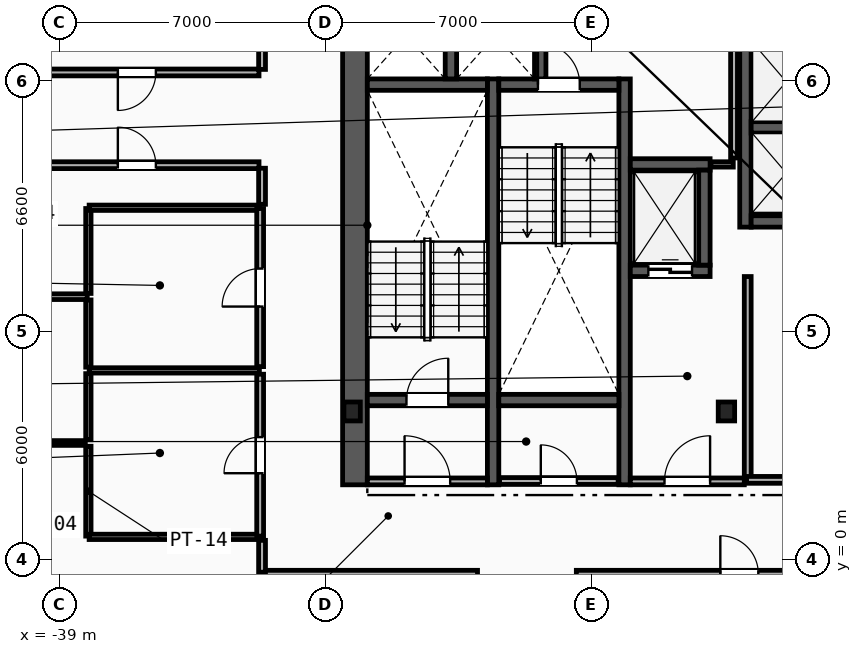
"""IFC4 building model, lengths in metres.
Left out: names, types, materials, properties, quantities, classifications, styles, units other than length and angle.
Written with IfcOpenShell. Run it as: python <this file> out.ifc"""

import sys

from ifc_helpers import new_model, si_unit, direction, frame, frame_2d, origin, origin_2d, place, context, subcontext, project, spatial, rectangle, i_section, extrude, element, fill, save


model = new_model("IFC4")
c1 = context("Model", 3, precision=1e-05, world=origin(), true_north=direction((0.0, 1.0)))
c2 = subcontext(c1, "Body", "Model", "MODEL_VIEW")
j1 = project(units=[si_unit("LENGTHUNIT", "METRE"), si_unit("PLANEANGLEUNIT", "RADIAN")], contexts=[c1])
p1 = place(None, origin())
s1 = spatial("IfcSite", under=j1, at=p1, CompositionType="ELEMENT")
p2 = place(p1, origin())
s2 = spatial("IfcBuilding", under=s1, at=p2, CompositionType="ELEMENT")
p3 = place(p2, frame((0.0, 0.0, 147.6)))
s3 = spatial("IfcBuildingStorey", under=s2, at=p3, CompositionType="ELEMENT", Elevation=147.6)
for number, where, z_axis, x_axis in (
    (1, (-31.3, 3.9, 0.0), (0.0, 0.0, 1.0), (1.0, 0.0, 0.0)),
    (2, (-21.45, 3.9, 0.0), (0.0, 0.0, 1.0), (1.0, 0.0, 0.0)),
):
    element("IfcColumn", number, at=place(p3, frame(where, z_axis=z_axis, x_axis=x_axis)), inside=s3, PredefinedType="COLUMN", context=c2, shape_type="SweptSolid", body=[
        extrude(i_section(OverallWidth=0.432, OverallDepth=0.498, WebThickness=0.056, FlangeThickness=0.089, FilletRadius=0.018, at=origin_2d()), origin(), (0.0, 0.0, 1.0), 3.6),
    ])
p4 = place(p3, frame((-31.225, 1.97, 0.0), z_axis=(0.0, 0.0, 1.0), x_axis=(0.0, 1.0, 0.0)))
e3 = element("IfcWall", 3, at=p4, inside=s3, PredefinedType="SHEAR", context=c2, shape_type="SweptSolid", body=[
    extrude(rectangle(XDim=13.33, YDim=0.65, at=frame_2d((6.665, 0.0))), origin(), (0.0, 0.0, 1.0), 3.36),
])
for number, where, z_axis, x_axis in (
    (4, (-27.59, 1.97, 0.0), (0.0, 0.0, 1.0), (0.0, 1.0, 0.0)),
    (5, (-24.13, 1.97, 0.0), (0.0, 0.0, 1.0), (0.0, 1.0, 0.0)),
):
    element("IfcWall", number, at=place(p3, frame(where, z_axis=z_axis, x_axis=x_axis)), inside=s3, PredefinedType="SHEAR", context=c2, shape_type="SweptSolid", body=[
        extrude(rectangle(XDim=10.68, YDim=0.3, at=frame_2d((5.34, 0.0))), origin(), (0.0, 0.0, 1.0), 3.36),
    ])
p5 = place(p3, frame((-30.9, 4.2, 0.0), z_axis=(0.0, 0.0, 1.0), x_axis=(1.0, 0.0, 0.0)))
e6 = element("IfcWall", 6, at=p5, inside=s3, PredefinedType="SHEAR", context=c2, shape_type="SweptSolid", body=[
    extrude(rectangle(XDim=3.16, YDim=0.3, at=frame_2d((1.58, 0.0))), origin(), (0.0, 0.0, 1.0), 3.36),
])
p6 = place(p5, frame((1.03, 0.0, 0.0)))
e7 = element("IfcOpeningElement", 7, at=p6, cuts=e6, PredefinedType="OPENING", context=c2, shape_type="SweptSolid", body=[
    extrude(rectangle(XDim=1.1, YDim=2.15, at=frame_2d((0.55, 1.075))), frame((0.0, 0.16, 0.0), z_axis=(0.0, -1.0, 0.0), x_axis=(1.0, 0.0, 0.0)), (0.0, 0.0, 1.0), 0.32),
])
p7 = place(p3, frame((-30.9, 12.5, 0.0), z_axis=(0.0, 0.0, 1.0), x_axis=(1.0, 0.0, 0.0)))
e8 = element("IfcWall", 8, at=p7, inside=s3, PredefinedType="SHEAR", context=c2, shape_type="SweptSolid", body=[
    extrude(rectangle(XDim=3.16, YDim=0.3, at=frame_2d((1.58, 0.0))), origin(), (0.0, 0.0, 1.0), 3.36),
])
p8 = place(p3, frame((-27.44, 12.5, 0.0), z_axis=(0.0, 0.0, 1.0), x_axis=(1.0, 0.0, 0.0)))
e9 = element("IfcWall", 9, at=p8, inside=s3, PredefinedType="SHEAR", context=c2, shape_type="SweptSolid", body=[
    extrude(rectangle(XDim=3.16, YDim=0.3, at=frame_2d((1.58, 0.0))), origin(), (0.0, 0.0, 1.0), 3.36),
])
p9 = place(p8, frame((1.03, 0.0, 0.0)))
e10 = element("IfcOpeningElement", 10, at=p9, cuts=e9, PredefinedType="OPENING", context=c2, shape_type="SweptSolid", body=[
    extrude(rectangle(XDim=1.1, YDim=2.15, at=frame_2d((0.55, 1.075))), frame((0.0, 0.16, 0.0), z_axis=(0.0, -1.0, 0.0), x_axis=(1.0, 0.0, 0.0)), (0.0, 0.0, 1.0), 0.32),
])
p10 = place(p3, frame((-27.44, 4.2, 0.0), z_axis=(0.0, 0.0, 1.0), x_axis=(1.0, 0.0, 0.0)))
e11 = element("IfcWall", 11, at=p10, inside=s3, PredefinedType="SHEAR", context=c2, shape_type="SweptSolid", body=[
    extrude(rectangle(XDim=3.16, YDim=0.3, at=frame_2d((1.58, 0.0))), origin(), (0.0, 0.0, 1.0), 3.36),
])
p11 = place(p3, frame((-20.89, 2.15, 0.0), z_axis=(0.0, 0.0, 1.0), x_axis=(0.0, 1.0, 0.0)))
e12 = element("IfcWall", 12, at=p11, inside=s3, PredefinedType="PARTITIONING", context=c2, shape_type="SweptSolid", body=[
    extrude(rectangle(XDim=5.3, YDim=0.18, at=frame_2d((2.65, 0.0))), origin(), (0.0, 0.0, 1.0), 3.36),
])
p12 = place(p3, frame((-23.98, 2.06, 0.0), z_axis=(0.0, 0.0, 1.0), x_axis=(1.0, 0.0, 0.0)))
e13 = element("IfcWall", 13, at=p12, inside=s3, PredefinedType="PARTITIONING", context=c2, shape_type="SweptSolid", body=[
    extrude(rectangle(XDim=3.0, YDim=0.18, at=frame_2d((1.5, 0.0))), origin(), (0.0, 0.0, 1.0), 3.36),
])
p13 = place(p12, frame((0.9, 0.0, 0.0)))
e14 = element("IfcOpeningElement", 14, at=p13, cuts=e13, PredefinedType="OPENING", context=c2, shape_type="SweptSolid", body=[
    extrude(rectangle(XDim=1.2, YDim=2.15, at=frame_2d((0.6, 1.075))), frame((0.0, 0.1, 0.0), z_axis=(0.0, -1.0, 0.0), x_axis=(1.0, 0.0, 0.0)), (0.0, 0.0, 1.0), 0.2),
])
p14 = place(p3, frame((-30.9, 2.06, 0.0), z_axis=(0.0, 0.0, 1.0), x_axis=(1.0, 0.0, 0.0)))
e15 = element("IfcWall", 15, at=p14, inside=s3, PredefinedType="PARTITIONING", context=c2, shape_type="SweptSolid", body=[
    extrude(rectangle(XDim=3.16, YDim=0.18, at=frame_2d((1.58, 0.0))), origin(), (0.0, 0.0, 1.0), 3.36),
])
p15 = place(p14, frame((0.98, 0.0, 0.0)))
e16 = element("IfcOpeningElement", 16, at=p15, cuts=e15, PredefinedType="OPENING", context=c2, shape_type="SweptSolid", body=[
    extrude(rectangle(XDim=1.2, YDim=2.15, at=frame_2d((0.6, 1.075))), frame((0.0, 0.1, 0.0), z_axis=(0.0, -1.0, 0.0), x_axis=(1.0, 0.0, 0.0)), (0.0, 0.0, 1.0), 0.2),
])
p16 = place(p3, frame((-23.98, 7.6, 0.0), z_axis=(0.0, 0.0, 1.0), x_axis=(1.0, 0.0, 0.0)))
e17 = element("IfcWall", 17, at=p16, inside=s3, PredefinedType="SHEAR", context=c2, shape_type="SweptSolid", body=[
    extrude(rectangle(XDim=2.1, YDim=0.3, at=frame_2d((1.05, 0.0))), origin(), (0.0, 0.0, 1.0), 3.36),
])
p17 = place(p16, frame((0.475, 0.0, 0.0)))
e18 = element("IfcOpeningElement", 18, at=p17, cuts=e17, PredefinedType="OPENING", context=c2, shape_type="SweptSolid", body=[
    extrude(rectangle(XDim=1.15, YDim=2.2, at=frame_2d((0.575, 1.1))), frame((0.0, 0.16, 0.0), z_axis=(0.0, -1.0, 0.0), x_axis=(1.0, 0.0, 0.0)), (0.0, 0.0, 1.0), 0.32),
])
p18 = place(p3, frame((-23.98, 10.4, 0.0), z_axis=(0.0, 0.0, 1.0), x_axis=(1.0, 0.0, 0.0)))
e19 = element("IfcWall", 19, at=p18, inside=s3, PredefinedType="SHEAR", context=c2, shape_type="SweptSolid", body=[
    extrude(rectangle(XDim=2.1, YDim=0.3, at=frame_2d((1.05, 0.0))), origin(), (0.0, 0.0, 1.0), 3.36),
])
p19 = place(p3, frame((-22.03, 7.75, 0.0), z_axis=(0.0, 0.0, 1.0), x_axis=(0.0, 1.0, 0.0)))
e20 = element("IfcWall", 20, at=p19, inside=s3, PredefinedType="SHEAR", context=c2, shape_type="SweptSolid", body=[
    extrude(rectangle(XDim=2.5, YDim=0.3, at=frame_2d((1.25, 0.0))), origin(), (0.0, 0.0, 1.0), 3.36),
])
for number, where, z_axis, x_axis in (
    (21, (-28.7, 12.65, 0.0), (0.0, 0.0, 1.0), (0.0, 1.0, 0.0)),
    (22, (-26.35, 12.65, 0.0), (0.0, 0.0, 1.0), (0.0, 1.0, 0.0)),
):
    element("IfcWall", number, at=place(p3, frame(where, z_axis=z_axis, x_axis=x_axis)), inside=s3, PredefinedType="SHEAR", context=c2, shape_type="SweptSolid", body=[
        extrude(rectangle(XDim=2.3, YDim=0.3, at=frame_2d((1.15, 0.0))), origin(), (0.0, 0.0, 1.0), 3.36),
    ])
p20 = place(p3, frame((-20.95, 8.75, 0.0), z_axis=(0.0, 0.0, 1.0), x_axis=(0.0, 1.0, 0.0)))
e23 = element("IfcWall", 23, at=p20, inside=s3, PredefinedType="SHEAR", context=c2, shape_type="SweptSolid", body=[
    extrude(rectangle(XDim=5.25, YDim=0.3, at=frame_2d((2.625, 0.0))), origin(), (0.0, 0.0, 1.0), 3.36),
])
p21 = place(p3, frame((-20.8, 8.9, 0.0), z_axis=(0.0, 0.0, 1.0), x_axis=(1.0, 0.0, 0.0)))
e24 = element("IfcWall", 24, at=p21, inside=s3, PredefinedType="SHEAR", context=c2, shape_type="SweptSolid", body=[
    extrude(rectangle(XDim=2.15, YDim=0.3, at=frame_2d((1.075, 0.0))), origin(), (0.0, 0.0, 1.0), 3.36),
])
p22 = place(p3, frame((-20.8, 11.375, 0.0), z_axis=(0.0, 0.0, 1.0), x_axis=(1.0, 0.0, 0.0)))
e25 = element("IfcWall", 25, at=p22, inside=s3, PredefinedType="SHEAR", context=c2, shape_type="SweptSolid", body=[
    extrude(rectangle(XDim=1.85, YDim=0.3, at=frame_2d((0.925, 0.0))), origin(), (0.0, 0.0, 1.0), 3.36),
])
p23 = place(p3, frame((-21.86, 10.4, 0.0), z_axis=(0.0, 0.0, 1.0), x_axis=(1.0, 0.0, 0.0)))
e26 = element("IfcWall", 26, at=p23, inside=s3, PredefinedType="PARTITIONING", context=c2, shape_type="SweptSolid", body=[
    extrude(rectangle(XDim=0.59, YDim=0.14, at=frame_2d((0.295, 0.0))), origin(), (0.0, 0.0, 1.0), 3.36),
])
p24 = place(p3, frame((-21.25, 10.57, 0.0), z_axis=(0.0, 0.0, 1.0), x_axis=(0.0, 1.0, 0.0)))
e27 = element("IfcWall", 27, at=p24, inside=s3, PredefinedType="PARTITIONING", context=c2, shape_type="SweptSolid", body=[
    extrude(rectangle(XDim=4.36, YDim=0.18, at=frame_2d((2.18, 0.0))), origin(), (0.0, 0.0, 1.0), 3.36),
])
p25 = place(p3, frame((-27.42, 2.07, 0.0), z_axis=(0.0, 0.0, 1.0), x_axis=(1.0, 0.0, 0.0)))
e28 = element("IfcWall", 28, at=p25, inside=s3, PredefinedType="PARTITIONING", context=c2, shape_type="SweptSolid", body=[
    extrude(rectangle(XDim=3.12, YDim=0.18, at=frame_2d((1.56, 0.0))), origin(), (0.0, 0.0, 1.0), 3.36),
])
p26 = place(p25, frame((1.085, 0.0, 0.0)))
e29 = element("IfcOpeningElement", 29, at=p26, cuts=e28, PredefinedType="OPENING", context=c2, shape_type="SweptSolid", body=[
    extrude(rectangle(XDim=0.95, YDim=2.1, at=frame_2d((0.475, 1.05))), frame((0.0, 0.1, 0.0), z_axis=(0.0, -1.0, 0.0), x_axis=(1.0, 0.0, 0.0)), (0.0, 0.0, 1.0), 0.2),
])
p27 = place(p3, frame((-38.24, 0.62, 0.0), z_axis=(0.0, 0.0, 1.0), x_axis=(0.0, 1.0, 0.0)))
e30 = element("IfcWall", 30, at=p27, inside=s3, PredefinedType="PARTITIONING", context=c2, shape_type="SweptSolid", body=[
    extrude(rectangle(XDim=2.365, YDim=0.14, at=frame_2d((1.183, 0.0))), origin(), (0.0, 0.0, 1.0), 3.36),
])
p28 = place(p3, frame((-38.24, 3.155, 0.0), z_axis=(0.0, 0.0, 1.0), x_axis=(0.0, 1.0, 0.0)))
e31 = element("IfcWall", 31, at=p28, inside=s3, PredefinedType="PARTITIONING", context=c2, shape_type="SweptSolid", body=[
    extrude(rectangle(XDim=1.74, YDim=0.14, at=frame_2d((0.87, 0.0))), origin(), (0.0, 0.0, 1.0), 3.36),
])
p29 = place(p3, frame((-38.24, 5.065, 0.0), z_axis=(0.0, 0.0, 1.0), x_axis=(0.0, 1.0, 0.0)))
e32 = element("IfcWall", 32, at=p29, inside=s3, PredefinedType="PARTITIONING", context=c2, shape_type="SweptSolid", body=[
    extrude(rectangle(XDim=1.77, YDim=0.14, at=frame_2d((0.885, 0.0))), origin(), (0.0, 0.0, 1.0), 3.36),
])
p30 = place(p3, frame((-38.24, 7.005, 0.0), z_axis=(0.0, 0.0, 1.0), x_axis=(0.0, 1.0, 0.0)))
e33 = element("IfcWall", 33, at=p30, inside=s3, PredefinedType="PARTITIONING", context=c2, shape_type="SweptSolid", body=[
    extrude(rectangle(XDim=2.235, YDim=0.14, at=frame_2d((1.118, 0.0))), origin(), (0.0, 0.0, 1.0), 3.36),
])
for number, where, z_axis, x_axis in (
    (34, (-38.22, 0.6, 0.0), (0.0, 0.0, 1.0), (1.0, 0.0, 0.0)),
    (35, (-38.22, 4.98, 0.0), (0.0, 0.0, 1.0), (1.0, 0.0, 0.0)),
    (36, (-38.22, 9.26, 0.0), (0.0, 0.0, 1.0), (1.0, 0.0, 0.0)),
):
    element("IfcWall", number, at=place(p3, frame(where, z_axis=z_axis, x_axis=x_axis)), inside=s3, PredefinedType="PARTITIONING", context=c2, shape_type="SweptSolid", body=[
        extrude(rectangle(XDim=4.48, YDim=0.14, at=frame_2d((2.24, 0.0))), origin(), (0.0, 0.0, 1.0), 3.36),
    ])
p31 = place(p3, frame((-33.72, 0.62, 0.0), z_axis=(0.0, 0.0, 1.0), x_axis=(0.0, 1.0, 0.0)))
e37 = element("IfcWall", 37, at=p31, inside=s3, PredefinedType="PARTITIONING", context=c2, shape_type="SweptSolid", body=[
    extrude(rectangle(XDim=4.26, YDim=0.18, at=frame_2d((2.13, 0.0))), origin(), (0.0, 0.0, 1.0), 3.36),
])
p32 = place(p31, frame((1.655, 0.0, 0.0)))
e38 = element("IfcOpeningElement", 38, at=p32, cuts=e37, PredefinedType="OPENING", context=c2, shape_type="SweptSolid", body=[
    extrude(rectangle(XDim=0.95, YDim=2.1, at=frame_2d((0.475, 1.05))), frame((0.0, 0.1, 0.0), z_axis=(0.0, -1.0, 0.0), x_axis=(1.0, 0.0, 0.0)), (0.0, 0.0, 1.0), 0.2),
])
p33 = place(p3, frame((-33.72, 5.08, 0.0), z_axis=(0.0, 0.0, 1.0), x_axis=(0.0, 1.0, 0.0)))
e39 = element("IfcWall", 39, at=p33, inside=s3, PredefinedType="PARTITIONING", context=c2, shape_type="SweptSolid", body=[
    extrude(rectangle(XDim=4.16, YDim=0.18, at=frame_2d((2.08, 0.0))), origin(), (0.0, 0.0, 1.0), 3.36),
])
p34 = place(p33, frame((1.58, 0.0, 0.0)))
e40 = element("IfcOpeningElement", 40, at=p34, cuts=e39, PredefinedType="OPENING", context=c2, shape_type="SweptSolid", body=[
    extrude(rectangle(XDim=1.0, YDim=2.15, at=frame_2d((0.5, 1.075))), frame((0.0, 0.1, 0.0), z_axis=(0.0, -1.0, 0.0), x_axis=(1.0, 0.0, 0.0)), (0.0, 0.0, 1.0), 0.2),
])
p35 = place(p3, frame((-50.526, 6.92, 0.0), z_axis=(0.0, 0.0, 1.0), x_axis=(1.0, 0.0, 0.0)))
e41 = element("IfcWall", 41, at=p35, inside=s3, PredefinedType="PARTITIONING", context=c2, shape_type="SweptSolid", body=[
    extrude(rectangle(XDim=12.256, YDim=0.15, at=frame_2d((6.128, 0.0))), origin(), (0.0, 0.0, 1.0), 3.36),
])
p36 = place(p3, frame((-33.628, -0.37, 0.0), z_axis=(0.0, 0.0, 1.0), x_axis=(1.0, 0.0, 0.0)))
e42 = element("IfcWall", 42, at=p36, inside=s3, PredefinedType="PARTITIONING", context=c2, shape_type="SweptSolid", body=[
    extrude(rectangle(XDim=5.628, YDim=0.18, at=frame_2d((2.814, 0.0))), origin(), (0.0, 0.0, 1.0), 3.36),
])
p37 = place(p3, frame((-33.67, 0.509, 0.0), z_axis=(0.0, 0.0, 1.0), x_axis=(0.0, -1.0, 0.0)))
e43 = element("IfcWall", 43, at=p37, inside=s3, PredefinedType="PARTITIONING", context=c2, shape_type="SweptSolid", body=[
    extrude(rectangle(XDim=0.837, YDim=0.18, at=frame_2d((0.418, 0.0))), origin(), (0.0, 0.0, 1.0), 3.36),
])
p38 = place(p3, frame((-25.4, -0.37, 0.0), z_axis=(0.0, 0.0, 1.0), x_axis=(1.0, 0.0, 0.0)))
e44 = element("IfcWall", 44, at=p38, inside=s3, PredefinedType="PARTITIONING", context=c2, shape_type="SweptSolid", body=[
    extrude(rectangle(XDim=8.578, YDim=0.18, at=frame_2d((4.289, 0.0))), origin(), (0.0, 0.0, 1.0), 3.36),
])
p39 = place(p38, frame((3.789, 0.0, 0.0)))
e45 = element("IfcOpeningElement", 45, at=p39, cuts=e44, PredefinedType="OPENING", context=c2, shape_type="SweptSolid", body=[
    extrude(rectangle(XDim=1.0, YDim=2.15, at=frame_2d((0.5, 1.075))), frame((0.0, 0.1, 0.0), z_axis=(0.0, -1.0, 0.0), x_axis=(1.0, 0.0, 0.0)), (0.0, 0.0, 1.0), 0.2),
])
p40 = place(p3, frame((-16.822, 2.1, 0.0), z_axis=(0.0, 0.0, 1.0), x_axis=(-1.0, 0.0, 0.0)))
e46 = element("IfcWall", 46, at=p40, inside=s3, PredefinedType="PARTITIONING", context=c2, shape_type="SweptSolid", body=[
    extrude(rectangle(XDim=4.098, YDim=0.18, at=frame_2d((2.049, 0.0))), origin(), (0.0, 0.0, 1.0), 3.36),
])
p41 = place(p3, frame((-40.178, 10.38, 0.0), z_axis=(0.0, 0.0, 1.0), x_axis=(1.0, 0.0, 0.0)))
e47 = element("IfcWall", 47, at=p41, inside=s3, PredefinedType="PARTITIONING", context=c2, shape_type="SweptSolid", body=[
    extrude(rectangle(XDim=6.428, YDim=0.18, at=frame_2d((3.214, 0.0))), origin(), (0.0, 0.0, 1.0), 3.36),
])
p42 = place(p41, frame((2.714, 0.0, 0.0)))
e48 = element("IfcOpeningElement", 48, at=p42, cuts=e47, PredefinedType="OPENING", context=c2, shape_type="SweptSolid", body=[
    extrude(rectangle(XDim=1.0, YDim=2.15, at=frame_2d((0.5, 1.075))), frame((0.0, 0.1, 0.0), z_axis=(0.0, -1.0, 0.0), x_axis=(1.0, 0.0, 0.0)), (0.0, 0.0, 1.0), 0.2),
])
p43 = place(p3, frame((-33.67, 10.3, 0.0), z_axis=(0.0, 0.0, 1.0), x_axis=(0.0, -1.0, 0.0)))
e49 = element("IfcWall", 49, at=p43, inside=s3, PredefinedType="PARTITIONING", context=c2, shape_type="SweptSolid", body=[
    extrude(rectangle(XDim=0.949, YDim=0.18, at=frame_2d((0.474, 0.0))), origin(), (0.0, 0.0, 1.0), 3.36),
])
p44 = place(p3, frame((-33.75, 12.82, 0.0), z_axis=(0.0, 0.0, 1.0), x_axis=(-1.0, 0.0, 0.0)))
e50 = element("IfcWall", 50, at=p44, inside=s3, PredefinedType="PARTITIONING", context=c2, shape_type="SweptSolid", body=[
    extrude(rectangle(XDim=6.428, YDim=0.18, at=frame_2d((3.214, 0.0))), origin(), (0.0, 0.0, 1.0), 3.36),
])
p45 = place(p44, frame((2.714, 0.0, 0.0)))
e51 = element("IfcOpeningElement", 51, at=p45, cuts=e50, PredefinedType="OPENING", context=c2, shape_type="SweptSolid", body=[
    extrude(rectangle(XDim=1.0, YDim=2.15, at=frame_2d((0.5, 1.075))), frame((0.0, 0.1, 0.0), z_axis=(0.0, -1.0, 0.0), x_axis=(1.0, 0.0, 0.0)), (0.0, 0.0, 1.0), 0.2),
])
p46 = place(p3, frame((-33.67, 14.23, 0.0), z_axis=(0.0, 0.0, 1.0), x_axis=(0.0, -1.0, 0.0)))
e52 = element("IfcWall", 52, at=p46, inside=s3, PredefinedType="PARTITIONING", context=c2, shape_type="SweptSolid", body=[
    extrude(rectangle(XDim=1.33, YDim=0.18, at=frame_2d((0.665, 0.0))), origin(), (0.0, 0.0, 1.0), 3.36),
])
p47 = place(p3, frame((-38.32, 3.07, 0.0), z_axis=(0.0, 0.0, 1.0), x_axis=(-1.0, 0.0, 0.0)))
e53 = element("IfcWall", 53, at=p47, inside=s3, PredefinedType="PARTITIONING", context=c2, shape_type="SweptSolid", body=[
    extrude(rectangle(XDim=12.631, YDim=0.125, at=frame_2d((6.316, 0.0))), origin(), (0.0, 0.0, 1.0), 3.36),
])
p48 = place(p47, frame((5.816, 0.0, 0.0)))
e54 = element("IfcOpeningElement", 54, at=p48, cuts=e53, PredefinedType="OPENING", context=c2, shape_type="SweptSolid", body=[
    extrude(rectangle(XDim=1.0, YDim=2.15, at=frame_2d((0.5, 1.075))), frame((0.0, 0.073, 0.0), z_axis=(0.0, -1.0, 0.0), x_axis=(1.0, 0.0, 0.0)), (0.0, 0.0, 1.0), 0.145),
])
p49 = place(p6, origin())
e55 = element("IfcDoor", 55, at=p49, inside=s3, OperationType="SINGLE_SWING_RIGHT", PredefinedType="DOOR", context=c2, shape_type="SweptSolid", body=[
    extrude(rectangle(XDim=1.1, YDim=2.15, at=frame_2d((0.55, 1.075))), frame((0.0, 0.025, 0.0), z_axis=(0.0, -1.0, 0.0), x_axis=(1.0, 0.0, 0.0)), (0.0, 0.0, 1.0), 0.05),
])
fill(e7, e55)
p50 = place(p9, origin())
e56 = element("IfcDoor", 56, at=p50, inside=s3, OperationType="SINGLE_SWING_LEFT", PredefinedType="DOOR", context=c2, shape_type="SweptSolid", body=[
    extrude(rectangle(XDim=1.1, YDim=2.15, at=frame_2d((0.55, 1.075))), frame((0.0, 0.025, 0.0), z_axis=(0.0, -1.0, 0.0), x_axis=(1.0, 0.0, 0.0)), (0.0, 0.0, 1.0), 0.05),
])
fill(e10, e56)
p51 = place(p13, origin())
e57 = element("IfcDoor", 57, at=p51, inside=s3, OperationType="SINGLE_SWING_RIGHT", PredefinedType="DOOR", context=c2, shape_type="SweptSolid", body=[
    extrude(rectangle(XDim=1.2, YDim=2.15, at=frame_2d((0.6, 1.075))), frame((0.0, 0.025, 0.0), z_axis=(0.0, -1.0, 0.0), x_axis=(1.0, 0.0, 0.0)), (0.0, 0.0, 1.0), 0.05),
])
fill(e14, e57)
p52 = place(p15, origin())
e58 = element("IfcDoor", 58, at=p52, inside=s3, OperationType="SINGLE_SWING_LEFT", PredefinedType="DOOR", context=c2, shape_type="SweptSolid", body=[
    extrude(rectangle(XDim=1.2, YDim=2.15, at=frame_2d((0.6, 1.075))), frame((0.0, 0.025, 0.0), z_axis=(0.0, -1.0, 0.0), x_axis=(1.0, 0.0, 0.0)), (0.0, 0.0, 1.0), 0.05),
])
fill(e16, e58)
p53 = place(p17, origin())
e59 = element("IfcDoor", 59, at=p53, inside=s3, OperationType="SLIDING_TO_LEFT", PredefinedType="TRAPDOOR", context=c2, shape_type="SweptSolid", body=[
    extrude(rectangle(XDim=1.15, YDim=2.2, at=frame_2d((0.575, 1.1))), frame((0.0, 0.025, 0.0), z_axis=(0.0, -1.0, 0.0), x_axis=(1.0, 0.0, 0.0)), (0.0, 0.0, 1.0), 0.05),
])
fill(e18, e59)
p54 = place(p39, origin())
e60 = element("IfcDoor", 60, at=p54, inside=s3, OperationType="SINGLE_SWING_LEFT", PredefinedType="DOOR", context=c2, shape_type="SweptSolid", body=[
    extrude(rectangle(XDim=1.0, YDim=2.15, at=frame_2d((0.5, 1.075))), frame((0.0, 0.025, 0.0), z_axis=(0.0, -1.0, 0.0), x_axis=(1.0, 0.0, 0.0)), (0.0, 0.0, 1.0), 0.05),
])
fill(e45, e60)
p55 = place(p42, origin())
e61 = element("IfcDoor", 61, at=p55, inside=s3, OperationType="SINGLE_SWING_LEFT", PredefinedType="DOOR", context=c2, shape_type="SweptSolid", body=[
    extrude(rectangle(XDim=1.0, YDim=2.15, at=frame_2d((0.5, 1.075))), frame((0.0, 0.025, 0.0), z_axis=(0.0, -1.0, 0.0), x_axis=(1.0, 0.0, 0.0)), (0.0, 0.0, 1.0), 0.05),
])
fill(e48, e61)
p56 = place(p45, origin())
e62 = element("IfcDoor", 62, at=p56, inside=s3, OperationType="SINGLE_SWING_RIGHT", PredefinedType="DOOR", context=c2, shape_type="SweptSolid", body=[
    extrude(rectangle(XDim=1.0, YDim=2.15, at=frame_2d((0.5, 1.075))), frame((0.0, 0.025, 0.0), z_axis=(0.0, -1.0, 0.0), x_axis=(1.0, 0.0, 0.0)), (0.0, 0.0, 1.0), 0.05),
])
fill(e51, e62)
p57 = place(p32, origin())
e63 = element("IfcDoor", 63, at=p57, inside=s3, OperationType="SINGLE_SWING_LEFT", PredefinedType="DOOR", context=c2, shape_type="SweptSolid", body=[
    extrude(rectangle(XDim=0.95, YDim=2.1, at=frame_2d((0.475, 1.05))), frame((0.0, 0.025, 0.0), z_axis=(0.0, -1.0, 0.0), x_axis=(1.0, 0.0, 0.0)), (0.0, 0.0, 1.0), 0.05),
])
fill(e38, e63)
p58 = place(p34, origin())
e64 = element("IfcDoor", 64, at=p58, inside=s3, OperationType="SINGLE_SWING_LEFT", PredefinedType="DOOR", context=c2, shape_type="SweptSolid", body=[
    extrude(rectangle(XDim=1.0, YDim=2.15, at=frame_2d((0.5, 1.075))), frame((0.0, 0.025, 0.0), z_axis=(0.0, -1.0, 0.0), x_axis=(1.0, 0.0, 0.0)), (0.0, 0.0, 1.0), 0.05),
])
fill(e40, e64)
p59 = place(p26, origin())
e65 = element("IfcDoor", 65, at=p59, inside=s3, OperationType="SINGLE_SWING_LEFT", PredefinedType="DOOR", context=c2, shape_type="SweptSolid", body=[
    extrude(rectangle(XDim=0.95, YDim=2.1, at=frame_2d((0.475, 1.05))), frame((0.0, 0.025, 0.0), z_axis=(0.0, -1.0, 0.0), x_axis=(1.0, 0.0, 0.0)), (0.0, 0.0, 1.0), 0.05),
])
fill(e29, e65)
save(model, sys.argv[1])
